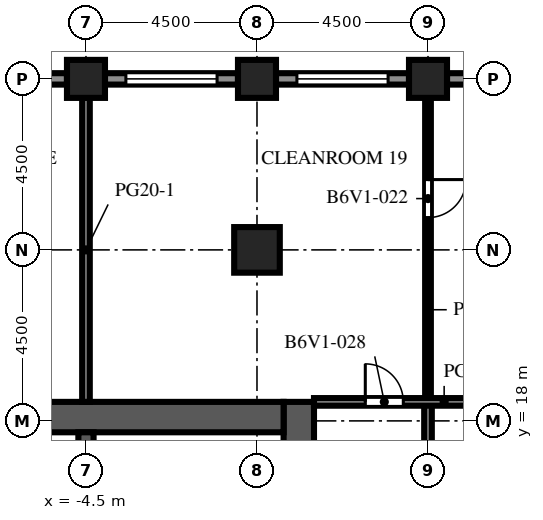
"""IFC4 building model, lengths in metres.
Left out: names, types, materials, properties, quantities, classifications, styles, units other than length and angle.
Written with IfcOpenShell. Run it as: python <this file> out.ifc"""

import sys

from ifc_helpers import new_model, si_unit, direction, frame, frame_2d, origin, origin_2d, place, context, subcontext, project, spatial, rectangle, extrude, element, fill, save


model = new_model("IFC4")
c1 = context("Model", 3, precision=1e-05, world=origin(), true_north=direction((0.0, 1.0)))
c2 = subcontext(c1, "Body", "Model", "MODEL_VIEW")
j1 = project(units=[si_unit("LENGTHUNIT", "METRE"), si_unit("PLANEANGLEUNIT", "RADIAN")], contexts=[c1])
p1 = place(None, origin())
s1 = spatial("IfcSite", under=j1, at=p1, CompositionType="ELEMENT")
p2 = place(p1, origin())
s2 = spatial("IfcBuilding", under=s1, at=p2, CompositionType="ELEMENT")
p3 = place(p2, frame((0.0, 0.0, 207.9)))
s3 = spatial("IfcBuildingStorey", under=s2, at=p3, CompositionType="ELEMENT", Elevation=207.9)
for number, where, z_axis, x_axis in (
    (1, (-4.5, 27.0, 0.0), (0.0, 0.0, 1.0), (1.0, 0.0, 0.0)),
    (2, (0.0, 27.0, 0.0), (0.0, 0.0, 1.0), (1.0, 0.0, 0.0)),
    (3, (4.5, 27.0, 0.0), (0.0, 0.0, 1.0), (1.0, 0.0, 0.0)),
):
    element("IfcColumn", number, at=place(p3, frame(where, z_axis=z_axis, x_axis=x_axis)), inside=s3, PredefinedType="COLUMN", context=c2, shape_type="SweptSolid", body=[
        extrude(rectangle(XDim=1.0, YDim=1.0, at=origin_2d()), origin(), (0.0, 0.0, 1.0), 4.1),
    ])
p4 = place(p3, frame((0.0, 22.5, 0.0), z_axis=(0.0, 0.0, 1.0), x_axis=(1.0, 0.0, 0.0)))
e4 = element("IfcColumn", 4, at=p4, inside=s3, PredefinedType="COLUMN", context=c2, shape_type="SweptSolid", body=[
    extrude(rectangle(XDim=1.2, YDim=1.2, at=origin_2d()), origin(), (0.0, 0.0, 1.0), 4.1),
])
p5 = place(p3, frame((1.1, -9.0, 0.0), z_axis=(0.0, 0.0, 1.0), x_axis=(0.0, 1.0, 0.0)))
e5 = element("IfcWall", 5, at=p5, inside=s3, PredefinedType="SHEAR", context=c2, shape_type="SweptSolid", body=[
    extrude(rectangle(XDim=27.5, YDim=0.8, at=frame_2d((13.75, 0.0))), origin(), (0.0, 0.0, 1.0), 4.1),
])
p6 = place(p5, frame((12.55, 0.0, 0.0)))
e6 = element("IfcOpeningElement", 6, at=p6, cuts=e5, PredefinedType="OPENING", context=c2, shape_type="SweptSolid", body=[
    extrude(rectangle(XDim=2.4, YDim=2.4, at=frame_2d((1.2, 1.2))), frame((0.0, 0.41, 0.0), z_axis=(0.0, -1.0, 0.0), x_axis=(1.0, 0.0, 0.0)), (0.0, 0.0, 1.0), 0.82),
])
p7 = place(p5, frame((3.95, 0.0, 0.0)))
e7 = element("IfcOpeningElement", 7, at=p7, cuts=e5, PredefinedType="OPENING", context=c2, shape_type="SweptSolid", body=[
    extrude(rectangle(XDim=1.2, YDim=2.1, at=frame_2d((0.6, 1.05))), frame((0.0, 0.41, 0.0), z_axis=(0.0, -1.0, 0.0), x_axis=(1.0, 0.0, 0.0)), (0.0, 0.0, 1.0), 0.82),
])
p8 = place(p5, frame((22.35, 0.0, 0.0)))
e8 = element("IfcOpeningElement", 8, at=p8, cuts=e5, PredefinedType="OPENING", context=c2, shape_type="SweptSolid", body=[
    extrude(rectangle(XDim=1.2, YDim=2.1, at=frame_2d((0.6, 1.05))), frame((0.0, 0.41, 0.0), z_axis=(0.0, -1.0, 0.0), x_axis=(1.0, 0.0, 0.0)), (0.0, 0.0, 1.0), 0.82),
])
p9 = place(p3, frame((-9.7, 18.1, 0.0), z_axis=(0.0, 0.0, 1.0), x_axis=(1.0, 0.0, 0.0)))
e9 = element("IfcWall", 9, at=p9, inside=s3, PredefinedType="SHEAR", context=c2, shape_type="SweptSolid", body=[
    extrude(rectangle(XDim=10.4, YDim=0.8, at=frame_2d((5.2, 0.0))), origin(), (0.0, 0.0, 1.0), 4.1),
])
p10 = place(p3, frame((-4.5, 10.2, 0.0), z_axis=(0.0, 0.0, 1.0), x_axis=(0.0, 1.0, 0.0)))
e10 = element("IfcWall", 10, at=p10, inside=s3, PredefinedType="SHEAR", context=c2, shape_type="SweptSolid", body=[
    extrude(rectangle(XDim=7.5, YDim=0.4, at=frame_2d((3.75, 0.0))), origin(), (0.0, 0.0, 1.0), 4.1),
])
p11 = place(p3, frame((5.0, 27.0, 0.0), z_axis=(0.0, 0.0, 1.0), x_axis=(1.0, 0.0, 0.0)))
e11 = element("IfcWall", 11, at=p11, inside=s3, PredefinedType="SOLIDWALL", context=c2, shape_type="SweptSolid", body=[
    extrude(rectangle(XDim=3.5, YDim=0.3, at=frame_2d((1.75, 0.0))), origin(), (0.0, 0.0, 1.0), 2.85),
])
p12 = place(p11, frame((0.55, 0.0, 0.8)))
e12 = element("IfcOpeningElement", 12, at=p12, cuts=e11, PredefinedType="OPENING", context=c2, shape_type="SweptSolid", body=[
    extrude(rectangle(XDim=2.4, YDim=1.7, at=frame_2d((1.2, 0.85))), frame((0.0, 0.16, 0.0), z_axis=(0.0, -1.0, 0.0), x_axis=(1.0, 0.0, 0.0)), (0.0, 0.0, 1.0), 0.32),
])
p13 = place(p3, frame((0.5, 27.0, 0.0), z_axis=(0.0, 0.0, 1.0), x_axis=(1.0, 0.0, 0.0)))
e13 = element("IfcWall", 13, at=p13, inside=s3, PredefinedType="SOLIDWALL", context=c2, shape_type="SweptSolid", body=[
    extrude(rectangle(XDim=3.5, YDim=0.3, at=frame_2d((1.75, 0.0))), origin(), (0.0, 0.0, 1.0), 2.85),
])
p14 = place(p13, frame((0.55, 0.0, 0.8)))
e14 = element("IfcOpeningElement", 14, at=p14, cuts=e13, PredefinedType="OPENING", context=c2, shape_type="SweptSolid", body=[
    extrude(rectangle(XDim=2.4, YDim=1.7, at=frame_2d((1.2, 0.85))), frame((0.0, 0.16, 0.0), z_axis=(0.0, -1.0, 0.0), x_axis=(1.0, 0.0, 0.0)), (0.0, 0.0, 1.0), 0.32),
])
p15 = place(p3, frame((-4.0, 27.0, 0.0), z_axis=(0.0, 0.0, 1.0), x_axis=(1.0, 0.0, 0.0)))
e15 = element("IfcWall", 15, at=p15, inside=s3, PredefinedType="SOLIDWALL", context=c2, shape_type="SweptSolid", body=[
    extrude(rectangle(XDim=3.5, YDim=0.3, at=frame_2d((1.75, 0.0))), origin(), (0.0, 0.0, 1.0), 2.85),
])
p16 = place(p15, frame((0.55, 0.0, 0.8)))
e16 = element("IfcOpeningElement", 16, at=p16, cuts=e15, PredefinedType="OPENING", context=c2, shape_type="SweptSolid", body=[
    extrude(rectangle(XDim=2.4, YDim=1.7, at=frame_2d((1.2, 0.85))), frame((0.0, 0.16, 0.0), z_axis=(0.0, -1.0, 0.0), x_axis=(1.0, 0.0, 0.0)), (0.0, 0.0, 1.0), 0.32),
])
p17 = place(p3, frame((-8.5, 27.0, 0.0), z_axis=(0.0, 0.0, 1.0), x_axis=(1.0, 0.0, 0.0)))
e17 = element("IfcWall", 17, at=p17, inside=s3, PredefinedType="SOLIDWALL", context=c2, shape_type="SweptSolid", body=[
    extrude(rectangle(XDim=3.5, YDim=0.3, at=frame_2d((1.75, 0.0))), origin(), (0.0, 0.0, 1.0), 2.85),
])
p18 = place(p17, frame((0.55, 0.0, 0.8)))
e18 = element("IfcOpeningElement", 18, at=p18, cuts=e17, PredefinedType="OPENING", context=c2, shape_type="SweptSolid", body=[
    extrude(rectangle(XDim=2.4, YDim=1.7, at=frame_2d((1.2, 0.85))), frame((0.0, 0.16, 0.0), z_axis=(0.0, -1.0, 0.0), x_axis=(1.0, 0.0, 0.0)), (0.0, 0.0, 1.0), 0.32),
])
p19 = place(p3, frame((-0.7, 14.85, 0.0), z_axis=(0.0, 0.0, 1.0), x_axis=(0.0, 1.0, 0.0)))
e19 = element("IfcWall", 19, at=p19, inside=s3, PredefinedType="PARTITIONING", context=c2, shape_type="SweptSolid", body=[
    extrude(rectangle(XDim=2.85, YDim=0.1, at=frame_2d((1.425, 0.0))), origin(), (0.0, 0.0, 1.0), 3.65),
])
p20 = place(p19, frame((0.925, 0.0, 0.0)))
e20 = element("IfcOpeningElement", 20, at=p20, cuts=e19, PredefinedType="OPENING", context=c2, shape_type="SweptSolid", body=[
    extrude(rectangle(XDim=1.0, YDim=2.1, at=frame_2d((0.5, 1.05))), frame((0.0, 0.06, 0.0), z_axis=(0.0, -1.0, 0.0), x_axis=(1.0, 0.0, 0.0)), (0.0, 0.0, 1.0), 0.12),
])
p21 = place(p3, frame((-4.5, 18.5, 0.0), z_axis=(0.0, 0.0, 1.0), x_axis=(0.0, 1.0, 0.0)))
e21 = element("IfcWall", 21, at=p21, inside=s3, PredefinedType="PARTITIONING", context=c2, shape_type="SweptSolid", body=[
    extrude(rectangle(XDim=8.0, YDim=0.2, at=frame_2d((4.0, 0.0))), origin(), (0.0, 0.0, 1.0), 3.65),
])
p22 = place(p3, frame((4.5, 26.5, 0.0), z_axis=(0.0, 0.0, 1.0), x_axis=(0.0, -1.0, 0.0)))
e22 = element("IfcWall", 22, at=p22, inside=s3, PredefinedType="PARTITIONING", context=c2, shape_type="SweptSolid", body=[
    extrude(rectangle(XDim=8.0, YDim=0.15, at=frame_2d((4.0, 0.0))), origin(), (0.0, 0.0, 1.0), 3.65),
])
p23 = place(p22, frame((2.15, 0.0, 0.0)))
e23 = element("IfcOpeningElement", 23, at=p23, cuts=e22, PredefinedType="OPENING", context=c2, shape_type="SweptSolid", body=[
    extrude(rectangle(XDim=1.0, YDim=2.1, at=frame_2d((0.5, 1.05))), frame((0.0, 0.085, 0.0), z_axis=(0.0, -1.0, 0.0), x_axis=(1.0, 0.0, 0.0)), (0.0, 0.0, 1.0), 0.17),
])
p24 = place(p3, frame((4.5, 18.5, 0.0), z_axis=(0.0, 0.0, 1.0), x_axis=(0.0, -1.0, 0.0)))
e24 = element("IfcWall", 24, at=p24, inside=s3, PredefinedType="PARTITIONING", context=c2, shape_type="SweptSolid", body=[
    extrude(rectangle(XDim=11.8, YDim=0.2, at=frame_2d((5.9, 0.0))), origin(), (0.0, 0.0, 1.0), 3.65),
])
p25 = place(p24, frame((6.45, 0.0, 0.0)))
e25 = element("IfcOpeningElement", 25, at=p25, cuts=e24, PredefinedType="OPENING", context=c2, shape_type="SweptSolid", body=[
    extrude(rectangle(XDim=1.0, YDim=2.1, at=frame_2d((0.5, 1.05))), frame((0.0, 0.11, 0.0), z_axis=(0.0, -1.0, 0.0), x_axis=(1.0, 0.0, 0.0)), (0.0, 0.0, 1.0), 0.22),
])
p26 = place(p3, frame((1.5, 18.5, 0.0), z_axis=(0.0, 0.0, 1.0), x_axis=(1.0, 0.0, 0.0)))
e26 = element("IfcWall", 26, at=p26, inside=s3, PredefinedType="PARTITIONING", context=c2, shape_type="SweptSolid", body=[
    extrude(rectangle(XDim=4.5, YDim=0.2, at=frame_2d((2.25, 0.0))), origin(), (0.0, 0.0, 1.0), 3.65),
])
p27 = place(p26, frame((1.35, 0.0, 0.0)))
e27 = element("IfcOpeningElement", 27, at=p27, cuts=e26, PredefinedType="OPENING", context=c2, shape_type="SweptSolid", body=[
    extrude(rectangle(XDim=1.0, YDim=2.1, at=frame_2d((0.5, 1.05))), frame((0.0, 0.11, 0.0), z_axis=(0.0, -1.0, 0.0), x_axis=(1.0, 0.0, 0.0)), (0.0, 0.0, 1.0), 0.22),
])
p28 = place(p14, origin())
e28 = element("IfcWindow", 28, at=p28, inside=s3, PartitioningType="SINGLE_PANEL", PredefinedType="WINDOW", context=c2, shape_type="SweptSolid", body=[
    extrude(rectangle(XDim=2.4, YDim=1.7, at=frame_2d((1.2, 0.85))), frame((0.0, 0.03, 0.0), z_axis=(0.0, -1.0, 0.0), x_axis=(1.0, 0.0, 0.0)), (0.0, 0.0, 1.0), 0.06),
])
fill(e14, e28)
p29 = place(p16, origin())
e29 = element("IfcWindow", 29, at=p29, inside=s3, PartitioningType="SINGLE_PANEL", PredefinedType="WINDOW", context=c2, shape_type="SweptSolid", body=[
    extrude(rectangle(XDim=2.4, YDim=1.7, at=frame_2d((1.2, 0.85))), frame((0.0, 0.03, 0.0), z_axis=(0.0, -1.0, 0.0), x_axis=(1.0, 0.0, 0.0)), (0.0, 0.0, 1.0), 0.06),
])
fill(e16, e29)
p30 = place(p23, origin())
e30 = element("IfcDoor", 30, at=p30, inside=s3, OperationType="SINGLE_SWING_LEFT", PredefinedType="DOOR", context=c2, shape_type="SweptSolid", body=[
    extrude(rectangle(XDim=1.0, YDim=2.1, at=frame_2d((0.5, 1.05))), frame((0.0, 0.025, 0.0), z_axis=(0.0, -1.0, 0.0), x_axis=(1.0, 0.0, 0.0)), (0.0, 0.0, 1.0), 0.05),
])
fill(e23, e30)
p31 = place(p27, origin())
e31 = element("IfcDoor", 31, at=p31, inside=s3, OperationType="SINGLE_SWING_LEFT", PredefinedType="DOOR", context=c2, shape_type="SweptSolid", body=[
    extrude(rectangle(XDim=1.0, YDim=2.1, at=frame_2d((0.5, 1.05))), frame((0.0, 0.025, 0.0), z_axis=(0.0, -1.0, 0.0), x_axis=(1.0, 0.0, 0.0)), (0.0, 0.0, 1.0), 0.05),
])
fill(e27, e31)
save(model, sys.argv[1])
